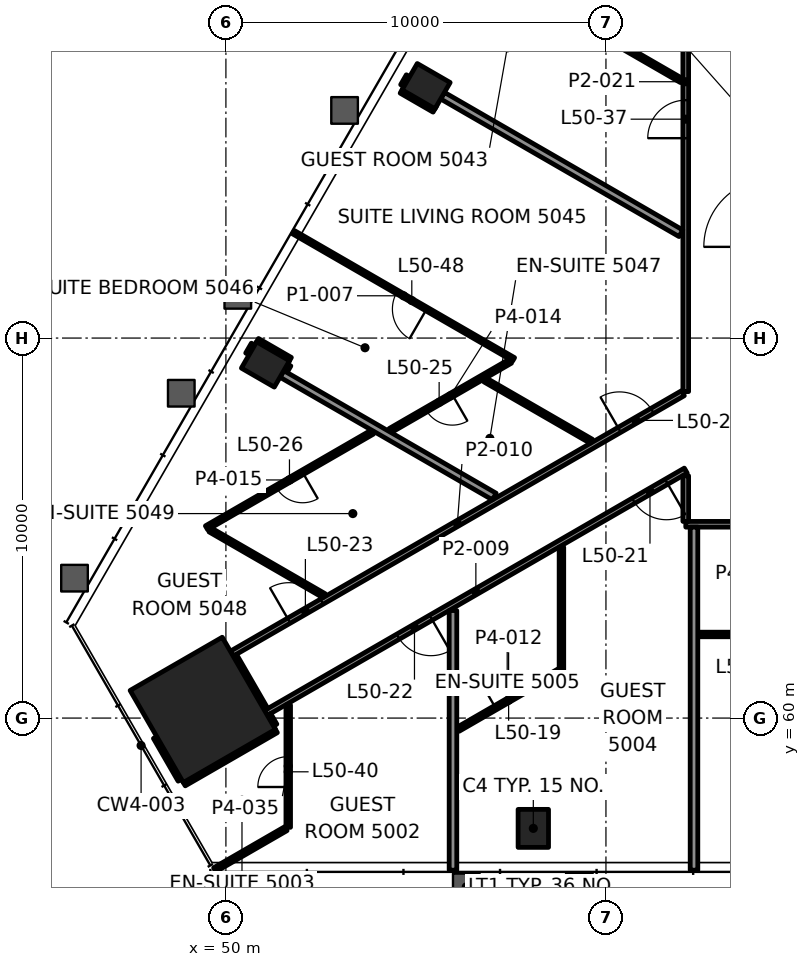
"""IFC4 building model, lengths in metres.
Left out: names, types, materials, properties, quantities, classifications, styles, units other than length and angle.
Written with IfcOpenShell. Run it as: python <this file> out.ifc"""

import sys

from ifc_helpers import new_model, si_unit, direction, frame, frame_2d, origin, origin_2d, place, context, subcontext, project, spatial, rectangle, hollow_rectangle, extrude, element, fill, save


model = new_model("IFC4")
c1 = context("Model", 3, precision=1e-05, world=origin(), true_north=direction((0.0, 1.0)))
c2 = subcontext(c1, "Body", "Model", "MODEL_VIEW")
j1 = project(units=[si_unit("LENGTHUNIT", "METRE"), si_unit("PLANEANGLEUNIT", "RADIAN")], contexts=[c1])
p1 = place(None, origin())
s1 = spatial("IfcSite", under=j1, at=p1, CompositionType="ELEMENT")
p2 = place(p1, origin())
s2 = spatial("IfcBuilding", under=s1, at=p2, CompositionType="ELEMENT")
p3 = place(p2, frame((0.0, 0.0, 214.3)))
s3 = spatial("IfcBuildingStorey", under=s2, at=p3, CompositionType="ELEMENT", Elevation=214.3)
p4 = place(p3, frame((49.392, 60.215, 0.0), z_axis=(0.0, 0.0, 1.0), x_axis=(0.5, -0.866025403784, 0.0)))
e1 = element("IfcColumn", 1, at=p4, inside=s3, PredefinedType="COLUMN", context=c2, shape_type="SweptSolid", body=[
    extrude(rectangle(XDim=2.8, YDim=2.8, at=origin_2d()), origin(), (0.0, 0.0, 1.0), 3.9),
])
for number, where, z_axis, x_axis in (
    (2, (58.089, 57.097, -0.0), (0.0, 0.0, 1.0), (1.0, 0.0, 0.0)),
    (3, (55.268, 76.628, -0.0), (0.0, 0.0, 1.0), (-0.5, -0.866, 0.0)),
    (4, (51.04, 69.306, -0.0), (0.0, 0.0, 1.0), (-0.5, -0.866, 0.0)),
):
    element("IfcColumn", number, at=place(p3, frame(where, z_axis=z_axis, x_axis=x_axis)), inside=s3, PredefinedType="COLUMN", context=c2, shape_type="SweptSolid", body=[
        extrude(hollow_rectangle(XDim=0.8, YDim=1.0, WallThickness=0.05, at=origin_2d()), origin(), (0.0, 0.0, 1.0), 3.9),
    ])
p5 = place(p3, frame((62.427, 62.2, 0.0), z_axis=(0.0, 0.0, 1.0), x_axis=(1.0, 0.0, 0.0)))
e5 = element("IfcWall", 5, at=p5, inside=s3, PredefinedType="PARTITIONING", context=c2, shape_type="SweptSolid", body=[
    extrude(rectangle(XDim=2.674, YDim=0.12, at=frame_2d((1.337, 0.0))), origin(), (0.0, 0.0, 1.0), 3.1),
])
p6 = place(p5, frame((0.937, 0.0, 0.0)))
e6 = element("IfcOpeningElement", 6, at=p6, cuts=e5, PredefinedType="OPENING", context=c2, shape_type="SweptSolid", body=[
    extrude(rectangle(XDim=0.8, YDim=2.1, at=frame_2d((0.4, 1.05))), frame((0.0, 0.07, 0.0), z_axis=(0.0, -1.0, 0.0), x_axis=(1.0, 0.0, 0.0)), (0.0, 0.0, 1.0), 0.14),
])
p7 = place(p3, frame((87.899, 65.1, 0.0), z_axis=(0.0, 0.0, 1.0), x_axis=(-1.0, 0.0, 0.0)))
e7 = element("IfcWall", 7, at=p7, inside=s3, PredefinedType="PARTITIONING", context=c2, shape_type="SweptSolid", body=[
    extrude(rectangle(XDim=25.799, YDim=0.15, at=frame_2d((12.899, 0.0))), origin(), (0.0, 0.0, 1.0), 3.1),
])
p8 = place(p7, frame((0.259, 0.0, 0.0)))
e8 = element("IfcOpeningElement", 8, at=p8, cuts=e7, PredefinedType="OPENING", context=c2, shape_type="SweptSolid", body=[
    extrude(rectangle(XDim=1.0, YDim=2.1, at=frame_2d((0.5, 1.05))), frame((0.0, 0.085, 0.0), z_axis=(0.0, -1.0, 0.0), x_axis=(1.0, 0.0, 0.0)), (0.0, 0.0, 1.0), 0.17),
])
p9 = place(p7, frame((4.641, 0.0, 0.0)))
e9 = element("IfcOpeningElement", 9, at=p9, cuts=e7, PredefinedType="OPENING", context=c2, shape_type="SweptSolid", body=[
    extrude(rectangle(XDim=1.0, YDim=2.1, at=frame_2d((0.5, 1.05))), frame((0.0, 0.085, 0.0), z_axis=(0.0, -1.0, 0.0), x_axis=(1.0, 0.0, 0.0)), (0.0, 0.0, 1.0), 0.17),
])
p10 = place(p7, frame((8.868, 0.0, 0.0)))
e10 = element("IfcOpeningElement", 10, at=p10, cuts=e7, PredefinedType="OPENING", context=c2, shape_type="SweptSolid", body=[
    extrude(rectangle(XDim=1.0, YDim=2.1, at=frame_2d((0.5, 1.05))), frame((0.0, 0.085, 0.0), z_axis=(0.0, -1.0, 0.0), x_axis=(1.0, 0.0, 0.0)), (0.0, 0.0, 1.0), 0.17),
])
p11 = place(p7, frame((13.271, 0.0, 0.0)))
e11 = element("IfcOpeningElement", 11, at=p11, cuts=e7, PredefinedType="OPENING", context=c2, shape_type="SweptSolid", body=[
    extrude(rectangle(XDim=1.0, YDim=2.1, at=frame_2d((0.5, 1.05))), frame((0.0, 0.085, 0.0), z_axis=(0.0, -1.0, 0.0), x_axis=(1.0, 0.0, 0.0)), (0.0, 0.0, 1.0), 0.17),
])
p12 = place(p7, frame((19.612, 0.0, 0.0)))
e12 = element("IfcOpeningElement", 12, at=p12, cuts=e7, PredefinedType="OPENING", context=c2, shape_type="SweptSolid", body=[
    extrude(rectangle(XDim=1.0, YDim=2.1, at=frame_2d((0.5, 1.05))), frame((0.0, 0.085, 0.0), z_axis=(0.0, -1.0, 0.0), x_axis=(1.0, 0.0, 0.0)), (0.0, 0.0, 1.0), 0.17),
])
p13 = place(p3, frame((49.707, 56.009, 0.0), z_axis=(0.0, 0.0, 1.0), x_axis=(0.865990033018, 0.500061258962, 0.0)))
e13 = element("IfcWall", 13, at=p13, inside=s3, PredefinedType="PARTITIONING", context=c2, shape_type="SweptSolid", body=[
    extrude(rectangle(XDim=2.162, YDim=0.12, at=frame_2d((1.081, 0.0))), origin(), (0.0, 0.0, 1.0), 3.1),
])
p14 = place(p3, frame((56.109, 59.706, 0.0), z_axis=(0.0, 0.0, 1.0), x_axis=(0.866042588199, 0.499970234539, 0.0)))
e14 = element("IfcWall", 14, at=p14, inside=s3, PredefinedType="PARTITIONING", context=c2, shape_type="SweptSolid", body=[
    extrude(rectangle(XDim=3.071, YDim=0.12, at=frame_2d((1.535, 0.0))), origin(), (0.0, 0.0, 1.0), 3.1),
])
p15 = place(p14, frame((1.135, 0.0, 0.0)))
e15 = element("IfcOpeningElement", 15, at=p15, cuts=e14, PredefinedType="OPENING", context=c2, shape_type="SweptSolid", body=[
    extrude(rectangle(XDim=0.8, YDim=2.1, at=frame_2d((0.4, 1.05))), frame((0.0, 0.07, 0.0), z_axis=(0.0, -1.0, 0.0), x_axis=(1.0, 0.0, 0.0)), (0.0, 0.0, 1.0), 0.14),
])
p16 = place(p3, frame((48.88, 58.303, 0.0), z_axis=(0.0, 0.0, 1.0), x_axis=(0.865985118016, 0.500069770506, 0.0)))
e16 = element("IfcWall", 16, at=p16, inside=s3, PredefinedType="PARTITIONING", context=c2, shape_type="SweptSolid", body=[
    extrude(rectangle(XDim=2.799, YDim=0.2, at=frame_2d((1.399, 0.0))), origin(), (0.0, 0.0, 1.0), 3.1),
])
p17 = place(p3, frame((62.1, 66.513, 0.0), z_axis=(0.0, 0.0, 1.0), x_axis=(-0.866025886419, -0.499999164051, 0.0)))
e17 = element("IfcWall", 17, at=p17, inside=s3, PredefinedType="PARTITIONING", context=c2, shape_type="SweptSolid", body=[
    extrude(rectangle(XDim=12.754, YDim=0.15, at=frame_2d((6.377, 0.0))), origin(), (0.0, 0.0, 1.0), 2.947),
])
p18 = place(p17, frame((0.587, 0.0, 0.0)))
e18 = element("IfcOpeningElement", 18, at=p18, cuts=e17, PredefinedType="OPENING", context=c2, shape_type="SweptSolid", body=[
    extrude(rectangle(XDim=1.0, YDim=2.1, at=frame_2d((0.5, 1.05))), frame((0.0, 0.085, 0.0), z_axis=(0.0, -1.0, 0.0), x_axis=(1.0, 0.0, 0.0)), (0.0, 0.0, 1.0), 0.17),
])
p19 = place(p17, frame((7.742, 0.0, 0.0)))
e19 = element("IfcOpeningElement", 19, at=p19, cuts=e17, PredefinedType="OPENING", context=c2, shape_type="SweptSolid", body=[
    extrude(rectangle(XDim=1.0, YDim=2.1, at=frame_2d((0.5, 1.05))), frame((0.0, 0.085, 0.0), z_axis=(0.0, -1.0, 0.0), x_axis=(1.0, 0.0, 0.0)), (0.0, 0.0, 1.0), 0.17),
])
p20 = place(p3, frame((50.155, 61.695, 0.0), z_axis=(0.0, 0.0, 1.0), x_axis=(0.8660236305, 0.500003071406, 0.0)))
e20 = element("IfcWall", 20, at=p20, inside=s3, PredefinedType="PARTITIONING", context=c2, shape_type="SweptSolid", body=[
    extrude(rectangle(XDim=13.707, YDim=0.15, at=frame_2d((6.853, 0.0))), origin(), (0.0, 0.0, 1.0), 3.1),
])
p21 = place(p20, frame((1.736, 0.0, 0.0)))
e21 = element("IfcOpeningElement", 21, at=p21, cuts=e20, PredefinedType="OPENING", context=c2, shape_type="SweptSolid", body=[
    extrude(rectangle(XDim=1.0, YDim=2.1, at=frame_2d((0.5, 1.05))), frame((0.0, 0.085, 0.0), z_axis=(0.0, -1.0, 0.0), x_axis=(1.0, 0.0, 0.0)), (0.0, 0.0, 1.0), 0.17),
])
p22 = place(p20, frame((11.777, 0.0, 0.0)))
e22 = element("IfcOpeningElement", 22, at=p22, cuts=e20, PredefinedType="OPENING", context=c2, shape_type="SweptSolid", body=[
    extrude(rectangle(XDim=1.0, YDim=2.1, at=frame_2d((0.5, 1.05))), frame((0.0, 0.085, 0.0), z_axis=(0.0, -1.0, 0.0), x_axis=(1.0, 0.0, 0.0)), (0.0, 0.0, 1.0), 0.17),
])
p23 = place(p3, frame((57.486, 69.392, 0.0), z_axis=(0.0, 0.0, 1.0), x_axis=(-0.866029747927, -0.499992475648, 0.0)))
e23 = element("IfcWall", 23, at=p23, inside=s3, PredefinedType="PARTITIONING", context=c2, shape_type="SweptSolid", body=[
    extrude(rectangle(XDim=3.652, YDim=0.12, at=frame_2d((1.826, 0.0))), origin(), (0.0, 0.0, 1.0), 3.1),
])
p24 = place(p23, frame((1.765, 0.0, 0.0)))
e24 = element("IfcOpeningElement", 24, at=p24, cuts=e23, PredefinedType="OPENING", context=c2, shape_type="SweptSolid", body=[
    extrude(rectangle(XDim=0.8, YDim=2.1, at=frame_2d((0.4, 1.05))), frame((0.0, 0.07, 0.0), z_axis=(0.0, -1.0, 0.0), x_axis=(1.0, 0.0, 0.0)), (0.0, 0.0, 1.0), 0.14),
])
p25 = place(p3, frame((53.854, 67.526, 0.0), z_axis=(0.0, 0.0, 1.0), x_axis=(-0.866025012717, -0.500000677347, 0.0)))
e25 = element("IfcWall", 25, at=p25, inside=s3, PredefinedType="PARTITIONING", context=c2, shape_type="SweptSolid", body=[
    extrude(rectangle(XDim=5.039, YDim=0.12, at=frame_2d((2.519, 0.0))), origin(), (0.0, 0.0, 1.0), 3.1),
])
p26 = place(p25, frame((2.119, 0.0, 0.0)))
e26 = element("IfcOpeningElement", 26, at=p26, cuts=e25, PredefinedType="OPENING", context=c2, shape_type="SweptSolid", body=[
    extrude(rectangle(XDim=0.8, YDim=2.1, at=frame_2d((0.4, 1.05))), frame((0.0, 0.07, 0.0), z_axis=(0.0, -1.0, 0.0), x_axis=(1.0, 0.0, 0.0)), (0.0, 0.0, 1.0), 0.14),
])
p27 = place(p3, frame((51.523, 69.143, 0.0), z_axis=(0.0, 0.0, 1.0), x_axis=(0.500359323436, 0.865817848887, 0.0)))
e27 = element("IfcWall", 27, at=p27, inside=s3, PredefinedType="PARTITIONING", context=c2, shape_type="SweptSolid", body=[
    extrude(rectangle(XDim=0.199, YDim=0.2, at=frame_2d((0.1, 0.0))), origin(), (0.0, 0.0, 1.0), 3.1),
])
p28 = place(p3, frame((50.607, 69.556, 0.0), z_axis=(0.0, 0.0, 1.0), x_axis=(0.49965177357, 0.866226359082, 0.0)))
e28 = element("IfcWall", 28, at=p28, inside=s3, PredefinedType="PARTITIONING", context=c2, shape_type="SweptSolid", body=[
    extrude(rectangle(XDim=0.299, YDim=0.2, at=frame_2d((0.149, 0.0))), origin(), (0.0, 0.0, 1.0), 3.1),
])
p29 = place(p3, frame((54.685, 76.619, 0.0), z_axis=(0.0, 0.0, 1.0), x_axis=(0.499816412211, 0.866131372301, 0.0)))
e29 = element("IfcWall", 29, at=p29, inside=s3, PredefinedType="PARTITIONING", context=c2, shape_type="SweptSolid", body=[
    extrude(rectangle(XDim=0.3, YDim=0.2, at=frame_2d((0.15, 0.0))), origin(), (0.0, 0.0, 1.0), 3.1),
])
p30 = place(p3, frame((62.317, 55.998, 0.0), z_axis=(0.0, 0.0, 1.0), x_axis=(0.0, 1.0, 0.0)))
e30 = element("IfcWall", 30, at=p30, inside=s3, PredefinedType="PARTITIONING", context=c2, shape_type="SweptSolid", body=[
    extrude(rectangle(XDim=9.027, YDim=0.2, at=frame_2d((4.514, 0.0))), origin(), (0.0, 0.0, 1.0), 3.022),
])
p31 = place(p3, frame((62.1, 65.176, 0.0), z_axis=(0.0, 0.0, 1.0), x_axis=(0.0, 1.0, 0.0)))
e31 = element("IfcWall", 31, at=p31, inside=s3, PredefinedType="PARTITIONING", context=c2, shape_type="SweptSolid", body=[
    extrude(rectangle(XDim=1.201, YDim=0.15, at=frame_2d((0.6, 0.0))), origin(), (0.0, 0.0, 1.0), 2.947),
])
p32 = place(p3, frame((62.1, 68.591, 0.0), z_axis=(0.0, 0.0, 1.0), x_axis=(0.0, 1.0, 0.0)))
e32 = element("IfcWall", 32, at=p32, inside=s3, PredefinedType="PARTITIONING", context=c2, shape_type="SweptSolid", body=[
    extrude(rectangle(XDim=16.309, YDim=0.15, at=frame_2d((8.154, 0.0))), origin(), (0.0, 0.0, 1.0), 3.1),
])
p33 = place(p32, frame((6.668, 0.0, 0.0)))
e33 = element("IfcOpeningElement", 33, at=p33, cuts=e32, PredefinedType="OPENING", context=c2, shape_type="SweptSolid", body=[
    extrude(rectangle(XDim=1.0, YDim=2.1, at=frame_2d((0.5, 1.05))), frame((0.0, 0.085, 0.0), z_axis=(0.0, -1.0, 0.0), x_axis=(1.0, 0.0, 0.0)), (0.0, 0.0, 1.0), 0.17),
])
p34 = place(p32, frame((13.991, 0.0, 0.0)))
e34 = element("IfcOpeningElement", 34, at=p34, cuts=e32, PredefinedType="OPENING", context=c2, shape_type="SweptSolid", body=[
    extrude(rectangle(XDim=1.0, YDim=2.1, at=frame_2d((0.5, 1.05))), frame((0.0, 0.085, 0.0), z_axis=(0.0, -1.0, 0.0), x_axis=(1.0, 0.0, 0.0)), (0.0, 0.0, 1.0), 0.17),
])
p35 = place(p3, frame((58.829, 61.276, 0.0), z_axis=(0.0, 0.0, 1.0), x_axis=(0.0, 1.0, 0.0)))
e35 = element("IfcWall", 35, at=p35, inside=s3, PredefinedType="PARTITIONING", context=c2, shape_type="SweptSolid", body=[
    extrude(rectangle(XDim=3.222, YDim=0.12, at=frame_2d((1.611, 0.0))), origin(), (0.0, 0.0, 1.0), 2.947),
])
p36 = place(p3, frame((55.975, 55.998, 0.0), z_axis=(0.0, 0.0, 1.0), x_axis=(0.0, 1.0, 0.0)))
e36 = element("IfcWall", 36, at=p36, inside=s3, PredefinedType="PARTITIONING", context=c2, shape_type="SweptSolid", body=[
    extrude(rectangle(XDim=6.832, YDim=0.2, at=frame_2d((3.416, 0.0))), origin(), (0.0, 0.0, 1.0), 3.1),
])
p37 = place(p3, frame((51.64, 57.125, 0.0), z_axis=(0.0, 0.0, 1.0), x_axis=(0.0, 1.0, 0.0)))
e37 = element("IfcWall", 37, at=p37, inside=s3, PredefinedType="PARTITIONING", context=c2, shape_type="SweptSolid", body=[
    extrude(rectangle(XDim=3.222, YDim=0.12, at=frame_2d((1.611, 0.0))), origin(), (0.0, 0.0, 1.0), 3.1),
])
p38 = place(p37, frame((1.061, 0.0, 0.0)))
e38 = element("IfcOpeningElement", 38, at=p38, cuts=e37, PredefinedType="OPENING", context=c2, shape_type="SweptSolid", body=[
    extrude(rectangle(XDim=0.8, YDim=2.1, at=frame_2d((0.4, 1.05))), frame((0.0, 0.07, 0.0), z_axis=(0.0, -1.0, 0.0), x_axis=(1.0, 0.0, 0.0)), (0.0, 0.0, 1.0), 0.14),
])
p39 = place(p3, frame((51.254, 59.79, 0.0), z_axis=(0.0, 0.0, 1.0), x_axis=(-0.499939380126, 0.866060399857, 0.0)))
e39 = element("IfcWall", 39, at=p39, inside=s3, PredefinedType="PARTITIONING", context=c2, shape_type="SweptSolid", body=[
    extrude(rectangle(XDim=0.325, YDim=0.2, at=frame_2d((0.162, 0.0))), origin(), (0.0, 0.0, 1.0), 3.1),
])
p40 = place(p3, frame((48.829, 58.39, 0.0), z_axis=(0.0, 0.0, 1.0), x_axis=(-0.500080332001, 0.865979019114, 0.0)))
e40 = element("IfcWall", 40, at=p40, inside=s3, PredefinedType="PARTITIONING", context=c2, shape_type="SweptSolid", body=[
    extrude(rectangle(XDim=1.299, YDim=0.2, at=frame_2d((0.649, 0.0))), origin(), (0.0, 0.0, 1.0), 3.1),
])
p41 = place(p3, frame((61.99, 76.775, 0.0), z_axis=(0.0, 0.0, 1.0), x_axis=(-0.866010186656, 0.500026355914, 0.0)))
e41 = element("IfcWall", 41, at=p41, inside=s3, PredefinedType="PARTITIONING", context=c2, shape_type="SweptSolid", body=[
    extrude(rectangle(XDim=3.222, YDim=0.12, at=frame_2d((1.611, 0.0))), origin(), (0.0, 0.0, 1.0), 3.1),
])
p42 = place(p3, frame((61.973, 72.757, 0.0), z_axis=(0.0, 0.0, 1.0), x_axis=(-0.866027278279, 0.499996753267, 0.0)))
e42 = element("IfcWall", 42, at=p42, inside=s3, PredefinedType="PARTITIONING", context=c2, shape_type="SweptSolid", body=[
    extrude(rectangle(XDim=7.242, YDim=0.2, at=frame_2d((3.621, 0.0))), origin(), (0.0, 0.0, 1.0), 3.1),
])
p43 = place(p3, frame((55.501, 76.032, 0.0), z_axis=(0.0, 0.0, 1.0), x_axis=(-0.866010750942, 0.50002537861, 0.0)))
e43 = element("IfcWall", 43, at=p43, inside=s3, PredefinedType="PARTITIONING", context=c2, shape_type="SweptSolid", body=[
    extrude(rectangle(XDim=1.0, YDim=0.2, at=frame_2d((0.5, 0.0))), origin(), (0.0, 0.0, 1.0), 3.022),
])
p44 = place(p3, frame((57.571, 69.441, 0.0), z_axis=(0.0, 0.0, 1.0), x_axis=(-0.866019636692, 0.500009988763, 0.0)))
e44 = element("IfcWall", 44, at=p44, inside=s3, PredefinedType="PARTITIONING", context=c2, shape_type="SweptSolid", body=[
    extrude(rectangle(XDim=6.688, YDim=0.1, at=frame_2d((3.344, 0.0))), origin(), (0.0, 0.0, 1.0), 3.022),
])
p45 = place(p44, frame((2.644, 0.0, 0.0)))
e45 = element("IfcOpeningElement", 45, at=p45, cuts=e44, PredefinedType="OPENING", context=c2, shape_type="SweptSolid", body=[
    extrude(rectangle(XDim=0.9, YDim=2.1, at=frame_2d((0.45, 1.05))), frame((0.0, 0.06, 0.0), z_axis=(0.0, -1.0, 0.0), x_axis=(1.0, 0.0, 0.0)), (0.0, 0.0, 1.0), 0.12),
])
p46 = place(p3, frame((59.615, 67.283, 0.0), z_axis=(0.0, 0.0, 1.0), x_axis=(-0.866000447062, 0.500043223821, 0.0)))
e46 = element("IfcWall", 46, at=p46, inside=s3, PredefinedType="PARTITIONING", context=c2, shape_type="SweptSolid", body=[
    extrude(rectangle(XDim=3.228, YDim=0.12, at=frame_2d((1.614, 0.0))), origin(), (0.0, 0.0, 1.0), 3.1),
])
p47 = place(p3, frame((51.673, 69.403, 0.0), z_axis=(0.0, 0.0, 1.0), x_axis=(-0.866039090965, 0.499976292358, 0.0)))
e47 = element("IfcWall", 47, at=p47, inside=s3, PredefinedType="PARTITIONING", context=c2, shape_type="SweptSolid", body=[
    extrude(rectangle(XDim=0.999, YDim=0.2, at=frame_2d((0.5, 0.0))), origin(), (0.0, 0.0, 1.0), 3.022),
])
p48 = place(p3, frame((57.062, 65.83, 0.0), z_axis=(0.0, 0.0, 1.0), x_axis=(-0.866041300655, 0.499972464802, 0.0)))
e48 = element("IfcWall", 48, at=p48, inside=s3, PredefinedType="PARTITIONING", context=c2, shape_type="SweptSolid", body=[
    extrude(rectangle(XDim=6.452, YDim=0.2, at=frame_2d((3.226, 0.0))), origin(), (0.0, 0.0, 1.0), 3.1),
])
p49 = place(p3, frame((52.581, 63.222, 0.0), z_axis=(0.0, 0.0, 1.0), x_axis=(-0.865997524453, 0.50004828531, 0.0)))
e49 = element("IfcWall", 49, at=p49, inside=s3, PredefinedType="PARTITIONING", context=c2, shape_type="SweptSolid", body=[
    extrude(rectangle(XDim=3.459, YDim=0.12, at=frame_2d((1.729, 0.0))), origin(), (0.0, 0.0, 1.0), 3.1),
])
p50 = place(p3, frame((51.017, 60.201, 0.0), z_axis=(0.0, 0.0, 1.0), x_axis=(-0.499991515992, 0.866030301974, 0.0)))
e50 = element("IfcWall", 50, at=p50, inside=s3, PredefinedType="PARTITIONING", context=c2, shape_type="SweptSolid", body=[
    extrude(rectangle(XDim=1.649, YDim=0.2, at=frame_2d((0.825, 0.0))), origin(), (0.0, 0.0, 1.0), 2.947),
])
p51 = place(p15, origin())
e51 = element("IfcDoor", 51, at=p51, inside=s3, OperationType="SINGLE_SWING_RIGHT", PredefinedType="DOOR", context=c2, shape_type="SweptSolid", body=[
    extrude(rectangle(XDim=0.8, YDim=2.1, at=frame_2d((0.4, 1.05))), frame((0.0, 0.025, 0.0), z_axis=(0.0, -1.0, 0.0), x_axis=(1.0, 0.0, 0.0)), (0.0, 0.0, 1.0), 0.05),
])
fill(e15, e51)
p52 = place(p18, origin())
e52 = element("IfcDoor", 52, at=p52, inside=s3, OperationType="SINGLE_SWING_RIGHT", PredefinedType="DOOR", context=c2, shape_type="SweptSolid", body=[
    extrude(rectangle(XDim=1.0, YDim=2.1, at=frame_2d((0.5, 1.05))), frame((0.0, 0.025, 0.0), z_axis=(0.0, -1.0, 0.0), x_axis=(1.0, 0.0, 0.0)), (0.0, 0.0, 1.0), 0.05),
])
fill(e18, e52)
p53 = place(p19, origin())
e53 = element("IfcDoor", 53, at=p53, inside=s3, OperationType="SINGLE_SWING_RIGHT", PredefinedType="DOOR", context=c2, shape_type="SweptSolid", body=[
    extrude(rectangle(XDim=1.0, YDim=2.1, at=frame_2d((0.5, 1.05))), frame((0.0, 0.025, 0.0), z_axis=(0.0, -1.0, 0.0), x_axis=(1.0, 0.0, 0.0)), (0.0, 0.0, 1.0), 0.05),
])
fill(e19, e53)
p54 = place(p21, origin())
e54 = element("IfcDoor", 54, at=p54, inside=s3, OperationType="SINGLE_SWING_LEFT", PredefinedType="DOOR", context=c2, shape_type="SweptSolid", body=[
    extrude(rectangle(XDim=1.0, YDim=2.1, at=frame_2d((0.5, 1.05))), frame((0.0, 0.025, 0.0), z_axis=(0.0, -1.0, 0.0), x_axis=(1.0, 0.0, 0.0)), (0.0, 0.0, 1.0), 0.05),
])
fill(e21, e54)
p55 = place(p22, origin())
e55 = element("IfcDoor", 55, at=p55, inside=s3, OperationType="SINGLE_SWING_RIGHT", PredefinedType="DOOR", context=c2, shape_type="SweptSolid", body=[
    extrude(rectangle(XDim=1.0, YDim=2.1, at=frame_2d((0.5, 1.05))), frame((0.0, 0.025, 0.0), z_axis=(0.0, -1.0, 0.0), x_axis=(1.0, 0.0, 0.0)), (0.0, 0.0, 1.0), 0.05),
])
fill(e22, e55)
p56 = place(p24, origin())
e56 = element("IfcDoor", 56, at=p56, inside=s3, OperationType="SINGLE_SWING_LEFT", PredefinedType="DOOR", context=c2, shape_type="SweptSolid", body=[
    extrude(rectangle(XDim=0.8, YDim=2.1, at=frame_2d((0.4, 1.05))), frame((0.0, 0.025, 0.0), z_axis=(0.0, -1.0, 0.0), x_axis=(1.0, 0.0, 0.0)), (0.0, 0.0, 1.0), 0.05),
])
fill(e24, e56)
p57 = place(p26, origin())
e57 = element("IfcDoor", 57, at=p57, inside=s3, OperationType="SINGLE_SWING_LEFT", PredefinedType="DOOR", context=c2, shape_type="SweptSolid", body=[
    extrude(rectangle(XDim=0.8, YDim=2.1, at=frame_2d((0.4, 1.05))), frame((0.0, 0.025, 0.0), z_axis=(0.0, -1.0, 0.0), x_axis=(1.0, 0.0, 0.0)), (0.0, 0.0, 1.0), 0.05),
])
fill(e26, e57)
p58 = place(p33, origin())
e58 = element("IfcDoor", 58, at=p58, inside=s3, OperationType="SINGLE_SWING_RIGHT", PredefinedType="DOOR", context=c2, shape_type="SweptSolid", body=[
    extrude(rectangle(XDim=1.0, YDim=2.1, at=frame_2d((0.5, 1.05))), frame((0.0, 0.025, 0.0), z_axis=(0.0, -1.0, 0.0), x_axis=(1.0, 0.0, 0.0)), (0.0, 0.0, 1.0), 0.05),
])
fill(e33, e58)
p59 = place(p38, origin())
e59 = element("IfcDoor", 59, at=p59, inside=s3, OperationType="SINGLE_SWING_RIGHT", PredefinedType="DOOR", context=c2, shape_type="SweptSolid", body=[
    extrude(rectangle(XDim=0.8, YDim=2.1, at=frame_2d((0.4, 1.05))), frame((0.0, 0.025, 0.0), z_axis=(0.0, -1.0, 0.0), x_axis=(1.0, 0.0, 0.0)), (0.0, 0.0, 1.0), 0.05),
])
fill(e38, e59)
p60 = place(p45, origin())
e60 = element("IfcDoor", 60, at=p60, inside=s3, OperationType="SINGLE_SWING_LEFT", PredefinedType="DOOR", context=c2, shape_type="SweptSolid", body=[
    extrude(rectangle(XDim=0.9, YDim=2.1, at=frame_2d((0.45, 1.05))), frame((0.0, 0.025, 0.0), z_axis=(0.0, -1.0, 0.0), x_axis=(1.0, 0.0, 0.0)), (0.0, 0.0, 1.0), 0.05),
])
fill(e45, e60)
p61 = place(p3, origin())
p62 = place(p61, frame((52.453, 55.952, 0.15), z_axis=(0.0, 0.0, 1.0), x_axis=(1.0, 0.0, 0.0)))
p63 = place(p62, origin())
e61 = element("IfcWindow", 61, at=p63, inside=s3, PartitioningType="SINGLE_PANEL", PredefinedType="WINDOW", context=c2, shape_type="SweptSolid", body=[
    extrude(rectangle(XDim=2.743, YDim=3.55, at=frame_2d((1.372, 1.775))), frame((0.0, 0.03, 0.0), z_axis=(0.0, -1.0, 0.0), x_axis=(1.0, 0.0, 0.0)), (0.0, 0.0, 1.0), 0.06),
])
p64 = place(p61, frame((52.838, 74.709, 0.15), z_axis=(0.0, 0.0, 1.0), x_axis=(-0.5, -0.866025, 0.0)))
p65 = place(p64, origin())
e62 = element("IfcWindow", 62, at=p65, inside=s3, PartitioningType="SINGLE_PANEL", PredefinedType="WINDOW", context=c2, shape_type="SweptSolid", body=[
    extrude(rectangle(XDim=2.743, YDim=3.55, at=frame_2d((1.372, 1.775))), frame((0.0, 0.03, 0.0), z_axis=(0.0, -1.0, 0.0), x_axis=(1.0, 0.0, 0.0)), (0.0, 0.0, 1.0), 0.06),
])
save(model, sys.argv[1])
